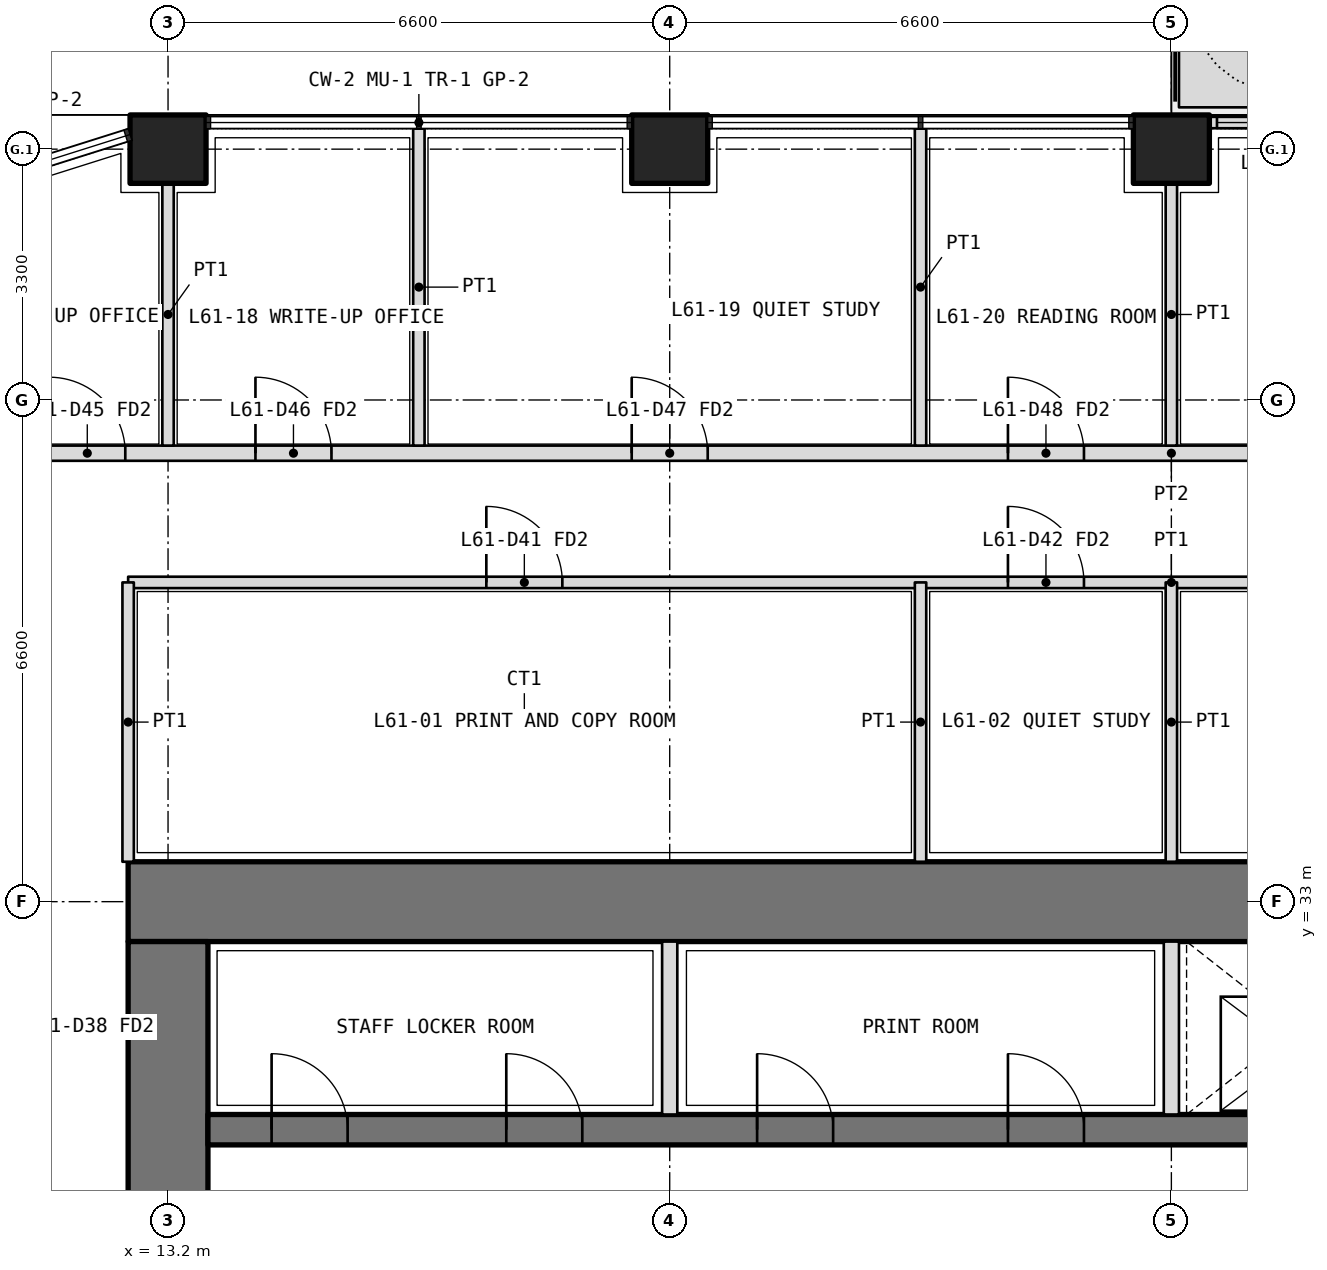
"""IFC4 building model, lengths in metres.
Left out: names, types, materials, properties, quantities, classifications, styles, units other than length and angle.
Written with IfcOpenShell. Run it as: python <this file> out.ifc"""

import sys

from ifc_helpers import new_model, si_unit, direction, frame, frame_2d, origin, origin_2d, place, context, subcontext, project, spatial, polyline, rectangle, outline, extrude, element, fill, save


model = new_model("IFC4")
c1 = context("Model", 3, precision=1e-05, world=origin(), true_north=direction((0.0, 1.0)))
c2 = subcontext(c1, "Body", "Model", "MODEL_VIEW")
j1 = project(units=[si_unit("LENGTHUNIT", "METRE"), si_unit("PLANEANGLEUNIT", "RADIAN")], contexts=[c1])
p1 = place(None, origin())
s1 = spatial("IfcSite", under=j1, at=p1, CompositionType="ELEMENT")
p2 = place(p1, origin())
s2 = spatial("IfcBuilding", under=s1, at=p2, CompositionType="ELEMENT")
p3 = place(p2, frame((0.0, 0.0, 267.0)))
s3 = spatial("IfcBuildingStorey", under=s2, at=p3, CompositionType="ELEMENT", Elevation=267.0)
for number, where, z_axis, x_axis in (
    (1, (13.2, 42.9, 0.0), (0.0, 0.0, 1.0), (1.0, 0.0, 0.0)),
    (2, (19.8, 42.9, 0.0), (0.0, 0.0, 1.0), (1.0, 0.0, 0.0)),
    (3, (26.4, 42.9, 0.0), (0.0, 0.0, 1.0), (1.0, 0.0, 0.0)),
):
    element("IfcColumn", number, at=place(p3, frame(where, z_axis=z_axis, x_axis=x_axis)), inside=s3, PredefinedType="COLUMN", context=c2, shape_type="SweptSolid", body=[
        extrude(rectangle(XDim=1.0, YDim=0.9, at=origin_2d()), origin(), (0.0, 0.0, 1.0), 4.2),
    ])
p4 = place(p3, origin())
e4 = element("IfcWall", 4, at=p4, inside=s3, PredefinedType="USERDEFINED", context=c2, shape_type="SweptSolid", body=[
    extrude(outline(polyline([(26.5, 43.45), (28.95, 43.45), (28.95, 44.45), (26.5, 44.45), (26.5, 43.45)]), holes=[polyline([(26.65, 43.6), (28.8, 43.6), (28.8, 44.3), (26.65, 44.3), (26.65, 43.6)])]), origin(), (0.0, 0.0, 1.0), 1.05),
])
p5 = place(p3, frame((32.5, 43.25, 0.0), z_axis=(0.0, 0.0, 1.0), x_axis=(-1.0, 0.0, 0.0)))
e5 = element("IfcWall", 5, at=p5, inside=s3, PredefinedType="SOLIDWALL", context=c2, shape_type="SweptSolid", body=[
    extrude(rectangle(XDim=5.6, YDim=0.15, at=frame_2d((2.8, 0.0))), origin(), (0.0, 0.0, 1.0), 2.7),
])
p6 = place(p5, frame((1.55, 0.0, 0.0)))
e6 = element("IfcOpeningElement", 6, at=p6, cuts=e5, PredefinedType="OPENING", context=c2, shape_type="SweptSolid", body=[
    extrude(rectangle(XDim=1.0, YDim=2.4, at=frame_2d((0.5, 1.2))), frame((0.0, 0.085, 0.0), z_axis=(0.0, -1.0, 0.0), x_axis=(1.0, 0.0, 0.0)), (0.0, 0.0, 1.0), 0.17),
])
p7 = place(p5, frame((0.1, 0.0, 0.1)))
e7 = element("IfcOpeningElement", 7, at=p7, cuts=e5, PredefinedType="OPENING", context=c2, shape_type="SweptSolid", body=[
    extrude(rectangle(XDim=1.35, YDim=2.3, at=frame_2d((0.675, 1.15))), frame((0.0, 0.085, 0.0), z_axis=(0.0, -1.0, 0.0), x_axis=(1.0, 0.0, 0.0)), (0.0, 0.0, 1.0), 0.17),
])
p8 = place(p5, frame((3.05, 0.0, 0.1)))
e8 = element("IfcOpeningElement", 8, at=p8, cuts=e5, PredefinedType="OPENING", context=c2, shape_type="SweptSolid", body=[
    extrude(rectangle(XDim=2.45, YDim=2.3, at=frame_2d((1.225, 1.15))), frame((0.0, 0.085, 0.0), z_axis=(0.0, -1.0, 0.0), x_axis=(1.0, 0.0, 0.0)), (0.0, 0.0, 1.0), 0.17),
])
p9 = place(p3, frame((40.125, 33.0, 0.0), z_axis=(0.0, 0.0, 1.0), x_axis=(-1.0, 0.0, 0.0)))
e9 = element("IfcWall", 9, at=p9, inside=s3, PredefinedType="SHEAR", context=c2, shape_type="SweptSolid", body=[
    extrude(rectangle(XDim=27.45, YDim=1.05, at=frame_2d((13.725, 0.0))), origin(), (0.0, 0.0, 1.0), 4.2),
])
p10 = place(p3, frame((13.2, 32.475, 0.0), z_axis=(0.0, 0.0, 1.0), x_axis=(0.0, -1.0, 0.0)))
e10 = element("IfcWall", 10, at=p10, inside=s3, PredefinedType="SHEAR", context=c2, shape_type="SweptSolid", body=[
    extrude(rectangle(XDim=18.75, YDim=1.05, at=frame_2d((9.375, 0.0))), origin(), (0.0, 0.0, 1.0), 4.2),
])
p11 = place(p10, frame((14.125, 0.0, 0.0)))
e11 = element("IfcOpeningElement", 11, at=p11, cuts=e10, PredefinedType="OPENING", context=c2, shape_type="SweptSolid", body=[
    extrude(rectangle(XDim=1.6, YDim=2.1, at=frame_2d((0.8, 1.05))), frame((0.0, 0.535, 0.0), z_axis=(0.0, -1.0, 0.0), x_axis=(1.0, 0.0, 0.0)), (0.0, 0.0, 1.0), 1.07),
])
p12 = place(p10, frame((3.325, 0.0, 0.0)))
e12 = element("IfcOpeningElement", 12, at=p12, cuts=e10, PredefinedType="OPENING", context=c2, shape_type="SweptSolid", body=[
    extrude(rectangle(XDim=1.6, YDim=2.1, at=frame_2d((0.8, 1.05))), frame((0.0, 0.535, 0.0), z_axis=(0.0, -1.0, 0.0), x_axis=(1.0, 0.0, 0.0)), (0.0, 0.0, 1.0), 1.07),
])
p13 = place(p3, frame((13.725, 30.0, 0.0), z_axis=(0.0, 0.0, 1.0), x_axis=(1.0, 0.0, 0.0)))
e13 = element("IfcWall", 13, at=p13, inside=s3, PredefinedType="SHEAR", context=c2, shape_type="SweptSolid", body=[
    extrude(rectangle(XDim=25.35, YDim=0.4, at=frame_2d((12.675, 0.0))), origin(), (0.0, 0.0, 1.0), 4.2),
])
p14 = place(p13, frame((0.837, 0.0, 0.0)))
e14 = element("IfcOpeningElement", 14, at=p14, cuts=e13, PredefinedType="OPENING", context=c2, shape_type="SweptSolid", body=[
    extrude(rectangle(XDim=1.0, YDim=2.1, at=frame_2d((0.5, 1.05))), frame((0.0, 0.21, 0.0), z_axis=(0.0, -1.0, 0.0), x_axis=(1.0, 0.0, 0.0)), (0.0, 0.0, 1.0), 0.42),
])
p15 = place(p13, frame((3.925, 0.0, 0.0)))
e15 = element("IfcOpeningElement", 15, at=p15, cuts=e13, PredefinedType="OPENING", context=c2, shape_type="SweptSolid", body=[
    extrude(rectangle(XDim=1.0, YDim=2.1, at=frame_2d((0.5, 1.05))), frame((0.0, 0.21, 0.0), z_axis=(0.0, -1.0, 0.0), x_axis=(1.0, 0.0, 0.0)), (0.0, 0.0, 1.0), 0.42),
])
p16 = place(p13, frame((7.225, 0.0, 0.0)))
e16 = element("IfcOpeningElement", 16, at=p16, cuts=e13, PredefinedType="OPENING", context=c2, shape_type="SweptSolid", body=[
    extrude(rectangle(XDim=1.0, YDim=2.1, at=frame_2d((0.5, 1.05))), frame((0.0, 0.21, 0.0), z_axis=(0.0, -1.0, 0.0), x_axis=(1.0, 0.0, 0.0)), (0.0, 0.0, 1.0), 0.42),
])
p17 = place(p13, frame((10.525, 0.0, 0.0)))
e17 = element("IfcOpeningElement", 17, at=p17, cuts=e13, PredefinedType="OPENING", context=c2, shape_type="SweptSolid", body=[
    extrude(rectangle(XDim=1.0, YDim=2.1, at=frame_2d((0.5, 1.05))), frame((0.0, 0.21, 0.0), z_axis=(0.0, -1.0, 0.0), x_axis=(1.0, 0.0, 0.0)), (0.0, 0.0, 1.0), 0.42),
])
p18 = place(p13, frame((13.775, 0.0, 0.0)))
e18 = element("IfcOpeningElement", 18, at=p18, cuts=e13, PredefinedType="OPENING", context=c2, shape_type="SweptSolid", body=[
    extrude(rectangle(XDim=1.1, YDim=2.1, at=frame_2d((0.55, 1.05))), frame((0.0, 0.21, 0.0), z_axis=(0.0, -1.0, 0.0), x_axis=(1.0, 0.0, 0.0)), (0.0, 0.0, 1.0), 0.42),
])
p19 = place(p13, frame((17.075, 0.0, 0.0)))
e19 = element("IfcOpeningElement", 19, at=p19, cuts=e13, PredefinedType="OPENING", context=c2, shape_type="SweptSolid", body=[
    extrude(rectangle(XDim=1.1, YDim=2.1, at=frame_2d((0.55, 1.05))), frame((0.0, 0.21, 0.0), z_axis=(0.0, -1.0, 0.0), x_axis=(1.0, 0.0, 0.0)), (0.0, 0.0, 1.0), 0.42),
])
p20 = place(p13, frame((20.375, 0.0, 0.0)))
e20 = element("IfcOpeningElement", 20, at=p20, cuts=e13, PredefinedType="OPENING", context=c2, shape_type="SweptSolid", body=[
    extrude(rectangle(XDim=1.1, YDim=2.1, at=frame_2d((0.55, 1.05))), frame((0.0, 0.21, 0.0), z_axis=(0.0, -1.0, 0.0), x_axis=(1.0, 0.0, 0.0)), (0.0, 0.0, 1.0), 0.42),
])
p21 = place(p13, frame((23.462, 0.0, 0.0)))
e21 = element("IfcOpeningElement", 21, at=p21, cuts=e13, PredefinedType="OPENING", context=c2, shape_type="SweptSolid", body=[
    extrude(rectangle(XDim=1.1, YDim=2.1, at=frame_2d((0.55, 1.05))), frame((0.0, 0.21, 0.0), z_axis=(0.0, -1.0, 0.0), x_axis=(1.0, 0.0, 0.0)), (0.0, 0.0, 1.0), 0.42),
])
for number, where, z_axis, x_axis in (
    (22, (19.8, 30.2, 0.0), (0.0, 0.0, 1.0), (0.0, 1.0, 0.0)),
    (23, (26.4, 30.2, 0.0), (0.0, 0.0, 1.0), (0.0, 1.0, 0.0)),
):
    element("IfcWall", number, at=place(p3, frame(where, z_axis=z_axis, x_axis=x_axis)), inside=s3, PredefinedType="PARTITIONING", context=c2, shape_type="SweptSolid", body=[
        extrude(rectangle(XDim=2.275, YDim=0.2, at=frame_2d((1.138, 0.0))), origin(), (0.0, 0.0, 1.0), 4.2),
    ])
p22 = place(p3, frame((12.675, 37.2, 0.0), z_axis=(0.0, 0.0, 1.0), x_axis=(1.0, 0.0, 0.0)))
e24 = element("IfcWall", 24, at=p22, inside=s3, PredefinedType="PARTITIONING", context=c2, shape_type="SweptSolid", body=[
    extrude(rectangle(XDim=27.45, YDim=0.15, at=frame_2d((13.725, 0.0))), origin(), (0.0, 0.0, 1.0), 3.0),
])
p23 = place(p22, frame((4.712, 0.0, 0.0)))
e25 = element("IfcOpeningElement", 25, at=p23, cuts=e24, PredefinedType="OPENING", context=c2, shape_type="SweptSolid", body=[
    extrude(rectangle(XDim=1.0, YDim=2.1, at=frame_2d((0.5, 1.05))), frame((0.0, 0.085, 0.0), z_axis=(0.0, -1.0, 0.0), x_axis=(1.0, 0.0, 0.0)), (0.0, 0.0, 1.0), 0.17),
])
p24 = place(p22, frame((11.575, 0.0, 0.0)))
e26 = element("IfcOpeningElement", 26, at=p24, cuts=e24, PredefinedType="OPENING", context=c2, shape_type="SweptSolid", body=[
    extrude(rectangle(XDim=1.0, YDim=2.1, at=frame_2d((0.5, 1.05))), frame((0.0, 0.085, 0.0), z_axis=(0.0, -1.0, 0.0), x_axis=(1.0, 0.0, 0.0)), (0.0, 0.0, 1.0), 0.17),
])
p25 = place(p22, frame((18.175, 0.0, 0.0)))
e27 = element("IfcOpeningElement", 27, at=p25, cuts=e24, PredefinedType="OPENING", context=c2, shape_type="SweptSolid", body=[
    extrude(rectangle(XDim=1.0, YDim=2.1, at=frame_2d((0.5, 1.05))), frame((0.0, 0.085, 0.0), z_axis=(0.0, -1.0, 0.0), x_axis=(1.0, 0.0, 0.0)), (0.0, 0.0, 1.0), 0.17),
])
p26 = place(p22, frame((25.038, 0.0, 0.0)))
e28 = element("IfcOpeningElement", 28, at=p26, cuts=e24, PredefinedType="OPENING", context=c2, shape_type="SweptSolid", body=[
    extrude(rectangle(XDim=1.0, YDim=2.1, at=frame_2d((0.5, 1.05))), frame((0.0, 0.085, 0.0), z_axis=(0.0, -1.0, 0.0), x_axis=(1.0, 0.0, 0.0)), (0.0, 0.0, 1.0), 0.17),
])
p27 = place(p3, frame((12.675, 33.525, 0.0), z_axis=(0.0, 0.0, 1.0), x_axis=(0.0, 1.0, 0.0)))
e29 = element("IfcWall", 29, at=p27, inside=s3, PredefinedType="PARTITIONING", context=c2, shape_type="SweptSolid", body=[
    extrude(rectangle(XDim=3.675, YDim=0.15, at=frame_2d((1.837, 0.0))), origin(), (0.0, 0.0, 1.0), 3.0),
])
p28 = place(p3, frame((23.1, 33.525, 0.0), z_axis=(0.0, 0.0, 1.0), x_axis=(0.0, 1.0, 0.0)))
e30 = element("IfcWall", 30, at=p28, inside=s3, PredefinedType="PARTITIONING", context=c2, shape_type="SweptSolid", body=[
    extrude(rectangle(XDim=3.675, YDim=0.15, at=frame_2d((1.837, 0.0))), origin(), (0.0, 0.0, 1.0), 3.9),
])
p29 = place(p3, frame((26.4, 33.525, 0.0), z_axis=(0.0, 0.0, 1.0), x_axis=(0.0, 1.0, 0.0)))
e31 = element("IfcWall", 31, at=p29, inside=s3, PredefinedType="PARTITIONING", context=c2, shape_type="SweptSolid", body=[
    extrude(rectangle(XDim=3.675, YDim=0.15, at=frame_2d((1.837, 0.0))), origin(), (0.0, 0.0, 1.0), 3.0),
])
p30 = place(p3, frame((10.975, 38.9, 0.0), z_axis=(0.0, 0.0, 1.0), x_axis=(1.0, 0.0, 0.0)))
e32 = element("IfcWall", 32, at=p30, inside=s3, PredefinedType="PARTITIONING", context=c2, shape_type="SweptSolid", body=[
    extrude(rectangle(XDim=30.85, YDim=0.2, at=frame_2d((15.425, 0.0))), origin(), (0.0, 0.0, 1.0), 3.0),
])
p31 = place(p30, frame((0.663, 0.0, 0.0)))
e33 = element("IfcOpeningElement", 33, at=p31, cuts=e32, PredefinedType="OPENING", context=c2, shape_type="SweptSolid", body=[
    extrude(rectangle(XDim=1.0, YDim=2.1, at=frame_2d((0.5, 1.05))), frame((0.0, 0.11, 0.0), z_axis=(0.0, -1.0, 0.0), x_axis=(1.0, 0.0, 0.0)), (0.0, 0.0, 1.0), 0.22),
])
p32 = place(p30, frame((3.375, 0.0, 0.0)))
e34 = element("IfcOpeningElement", 34, at=p32, cuts=e32, PredefinedType="OPENING", context=c2, shape_type="SweptSolid", body=[
    extrude(rectangle(XDim=1.0, YDim=2.1, at=frame_2d((0.5, 1.05))), frame((0.0, 0.11, 0.0), z_axis=(0.0, -1.0, 0.0), x_axis=(1.0, 0.0, 0.0)), (0.0, 0.0, 1.0), 0.22),
])
p33 = place(p30, frame((8.325, 0.0, 0.0)))
e35 = element("IfcOpeningElement", 35, at=p33, cuts=e32, PredefinedType="OPENING", context=c2, shape_type="SweptSolid", body=[
    extrude(rectangle(XDim=1.0, YDim=2.1, at=frame_2d((0.5, 1.05))), frame((0.0, 0.11, 0.0), z_axis=(0.0, -1.0, 0.0), x_axis=(1.0, 0.0, 0.0)), (0.0, 0.0, 1.0), 0.22),
])
p34 = place(p30, frame((13.275, 0.0, 0.0)))
e36 = element("IfcOpeningElement", 36, at=p34, cuts=e32, PredefinedType="OPENING", context=c2, shape_type="SweptSolid", body=[
    extrude(rectangle(XDim=1.0, YDim=2.1, at=frame_2d((0.5, 1.05))), frame((0.0, 0.11, 0.0), z_axis=(0.0, -1.0, 0.0), x_axis=(1.0, 0.0, 0.0)), (0.0, 0.0, 1.0), 0.22),
])
p35 = place(p30, frame((22.587, 0.0, 0.0)))
e37 = element("IfcOpeningElement", 37, at=p35, cuts=e32, PredefinedType="OPENING", context=c2, shape_type="SweptSolid", body=[
    extrude(rectangle(XDim=1.0, YDim=2.1, at=frame_2d((0.5, 1.05))), frame((0.0, 0.11, 0.0), z_axis=(0.0, -1.0, 0.0), x_axis=(1.0, 0.0, 0.0)), (0.0, 0.0, 1.0), 0.22),
])
p36 = place(p3, frame((13.2, 42.45, 0.0), z_axis=(0.0, 0.0, 1.0), x_axis=(0.0, -1.0, 0.0)))
e38 = element("IfcWall", 38, at=p36, inside=s3, PredefinedType="PARTITIONING", context=c2, shape_type="SweptSolid", body=[
    extrude(rectangle(XDim=3.45, YDim=0.15, at=frame_2d((1.725, 0.0))), origin(), (0.0, 0.0, 1.0), 3.0),
])
for number, where, z_axis, x_axis in (
    (39, (16.5, 43.17, 0.0), (0.0, 0.0, 1.0), (0.0, -1.0, 0.0)),
    (40, (23.1, 43.17, 0.0), (0.0, 0.0, 1.0), (0.0, -1.0, 0.0)),
):
    element("IfcWall", number, at=place(p3, frame(where, z_axis=z_axis, x_axis=x_axis)), inside=s3, PredefinedType="PARTITIONING", context=c2, shape_type="SweptSolid", body=[
        extrude(rectangle(XDim=4.17, YDim=0.15, at=frame_2d((2.085, 0.0))), origin(), (0.0, 0.0, 1.0), 2.7),
    ])
p37 = place(p3, frame((26.4, 42.45, 0.0), z_axis=(0.0, 0.0, 1.0), x_axis=(0.0, -1.0, 0.0)))
e41 = element("IfcWall", 41, at=p37, inside=s3, PredefinedType="PARTITIONING", context=c2, shape_type="SweptSolid", body=[
    extrude(rectangle(XDim=3.45, YDim=0.15, at=frame_2d((1.725, 0.0))), origin(), (0.0, 0.0, 1.0), 3.0),
])
p38 = place(p8, origin())
e42 = element("IfcWindow", 42, at=p38, inside=s3, PartitioningType="SINGLE_PANEL", PredefinedType="WINDOW", context=c2, shape_type="SweptSolid", body=[
    extrude(rectangle(XDim=2.45, YDim=2.3, at=frame_2d((1.225, 1.15))), frame((0.0, 0.03, 0.0), z_axis=(0.0, -1.0, 0.0), x_axis=(1.0, 0.0, 0.0)), (0.0, 0.0, 1.0), 0.06),
])
fill(e8, e42)
p39 = place(p23, origin())
e43 = element("IfcDoor", 43, at=p39, inside=s3, OperationType="SINGLE_SWING_LEFT", PredefinedType="DOOR", context=c2, shape_type="SweptSolid", body=[
    extrude(rectangle(XDim=1.0, YDim=2.1, at=frame_2d((0.5, 1.05))), frame((0.0, 0.025, 0.0), z_axis=(0.0, -1.0, 0.0), x_axis=(1.0, 0.0, 0.0)), (0.0, 0.0, 1.0), 0.05),
])
fill(e25, e43)
p40 = place(p24, origin())
e44 = element("IfcDoor", 44, at=p40, inside=s3, OperationType="SINGLE_SWING_LEFT", PredefinedType="DOOR", context=c2, shape_type="SweptSolid", body=[
    extrude(rectangle(XDim=1.0, YDim=2.1, at=frame_2d((0.5, 1.05))), frame((0.0, 0.025, 0.0), z_axis=(0.0, -1.0, 0.0), x_axis=(1.0, 0.0, 0.0)), (0.0, 0.0, 1.0), 0.05),
])
fill(e26, e44)
p41 = place(p31, origin())
e45 = element("IfcDoor", 45, at=p41, inside=s3, OperationType="SINGLE_SWING_LEFT", PredefinedType="DOOR", context=c2, shape_type="SweptSolid", body=[
    extrude(rectangle(XDim=1.0, YDim=2.1, at=frame_2d((0.5, 1.05))), frame((0.0, 0.025, 0.0), z_axis=(0.0, -1.0, 0.0), x_axis=(1.0, 0.0, 0.0)), (0.0, 0.0, 1.0), 0.05),
])
fill(e33, e45)
p42 = place(p32, origin())
e46 = element("IfcDoor", 46, at=p42, inside=s3, OperationType="SINGLE_SWING_LEFT", PredefinedType="DOOR", context=c2, shape_type="SweptSolid", body=[
    extrude(rectangle(XDim=1.0, YDim=2.1, at=frame_2d((0.5, 1.05))), frame((0.0, 0.025, 0.0), z_axis=(0.0, -1.0, 0.0), x_axis=(1.0, 0.0, 0.0)), (0.0, 0.0, 1.0), 0.05),
])
fill(e34, e46)
p43 = place(p33, origin())
e47 = element("IfcDoor", 47, at=p43, inside=s3, OperationType="SINGLE_SWING_LEFT", PredefinedType="DOOR", context=c2, shape_type="SweptSolid", body=[
    extrude(rectangle(XDim=1.0, YDim=2.1, at=frame_2d((0.5, 1.05))), frame((0.0, 0.025, 0.0), z_axis=(0.0, -1.0, 0.0), x_axis=(1.0, 0.0, 0.0)), (0.0, 0.0, 1.0), 0.05),
])
fill(e35, e47)
p44 = place(p34, origin())
e48 = element("IfcDoor", 48, at=p44, inside=s3, OperationType="SINGLE_SWING_LEFT", PredefinedType="DOOR", context=c2, shape_type="SweptSolid", body=[
    extrude(rectangle(XDim=1.0, YDim=2.1, at=frame_2d((0.5, 1.05))), frame((0.0, 0.025, 0.0), z_axis=(0.0, -1.0, 0.0), x_axis=(1.0, 0.0, 0.0)), (0.0, 0.0, 1.0), 0.05),
])
fill(e36, e48)
p45 = place(p14, origin())
e49 = element("IfcDoor", 49, at=p45, inside=s3, OperationType="SINGLE_SWING_LEFT", PredefinedType="DOOR", context=c2, shape_type="SweptSolid", body=[
    extrude(rectangle(XDim=1.0, YDim=2.1, at=frame_2d((0.5, 1.05))), frame((0.0, 0.025, 0.0), z_axis=(0.0, -1.0, 0.0), x_axis=(1.0, 0.0, 0.0)), (0.0, 0.0, 1.0), 0.05),
])
fill(e14, e49)
p46 = place(p15, origin())
e50 = element("IfcDoor", 50, at=p46, inside=s3, OperationType="SINGLE_SWING_LEFT", PredefinedType="DOOR", context=c2, shape_type="SweptSolid", body=[
    extrude(rectangle(XDim=1.0, YDim=2.1, at=frame_2d((0.5, 1.05))), frame((0.0, 0.025, 0.0), z_axis=(0.0, -1.0, 0.0), x_axis=(1.0, 0.0, 0.0)), (0.0, 0.0, 1.0), 0.05),
])
fill(e15, e50)
p47 = place(p16, origin())
e51 = element("IfcDoor", 51, at=p47, inside=s3, OperationType="SINGLE_SWING_LEFT", PredefinedType="DOOR", context=c2, shape_type="SweptSolid", body=[
    extrude(rectangle(XDim=1.0, YDim=2.1, at=frame_2d((0.5, 1.05))), frame((0.0, 0.025, 0.0), z_axis=(0.0, -1.0, 0.0), x_axis=(1.0, 0.0, 0.0)), (0.0, 0.0, 1.0), 0.05),
])
fill(e16, e51)
p48 = place(p17, origin())
e52 = element("IfcDoor", 52, at=p48, inside=s3, OperationType="SINGLE_SWING_LEFT", PredefinedType="DOOR", context=c2, shape_type="SweptSolid", body=[
    extrude(rectangle(XDim=1.0, YDim=2.1, at=frame_2d((0.5, 1.05))), frame((0.0, 0.025, 0.0), z_axis=(0.0, -1.0, 0.0), x_axis=(1.0, 0.0, 0.0)), (0.0, 0.0, 1.0), 0.05),
])
fill(e17, e52)
save(model, sys.argv[1])
